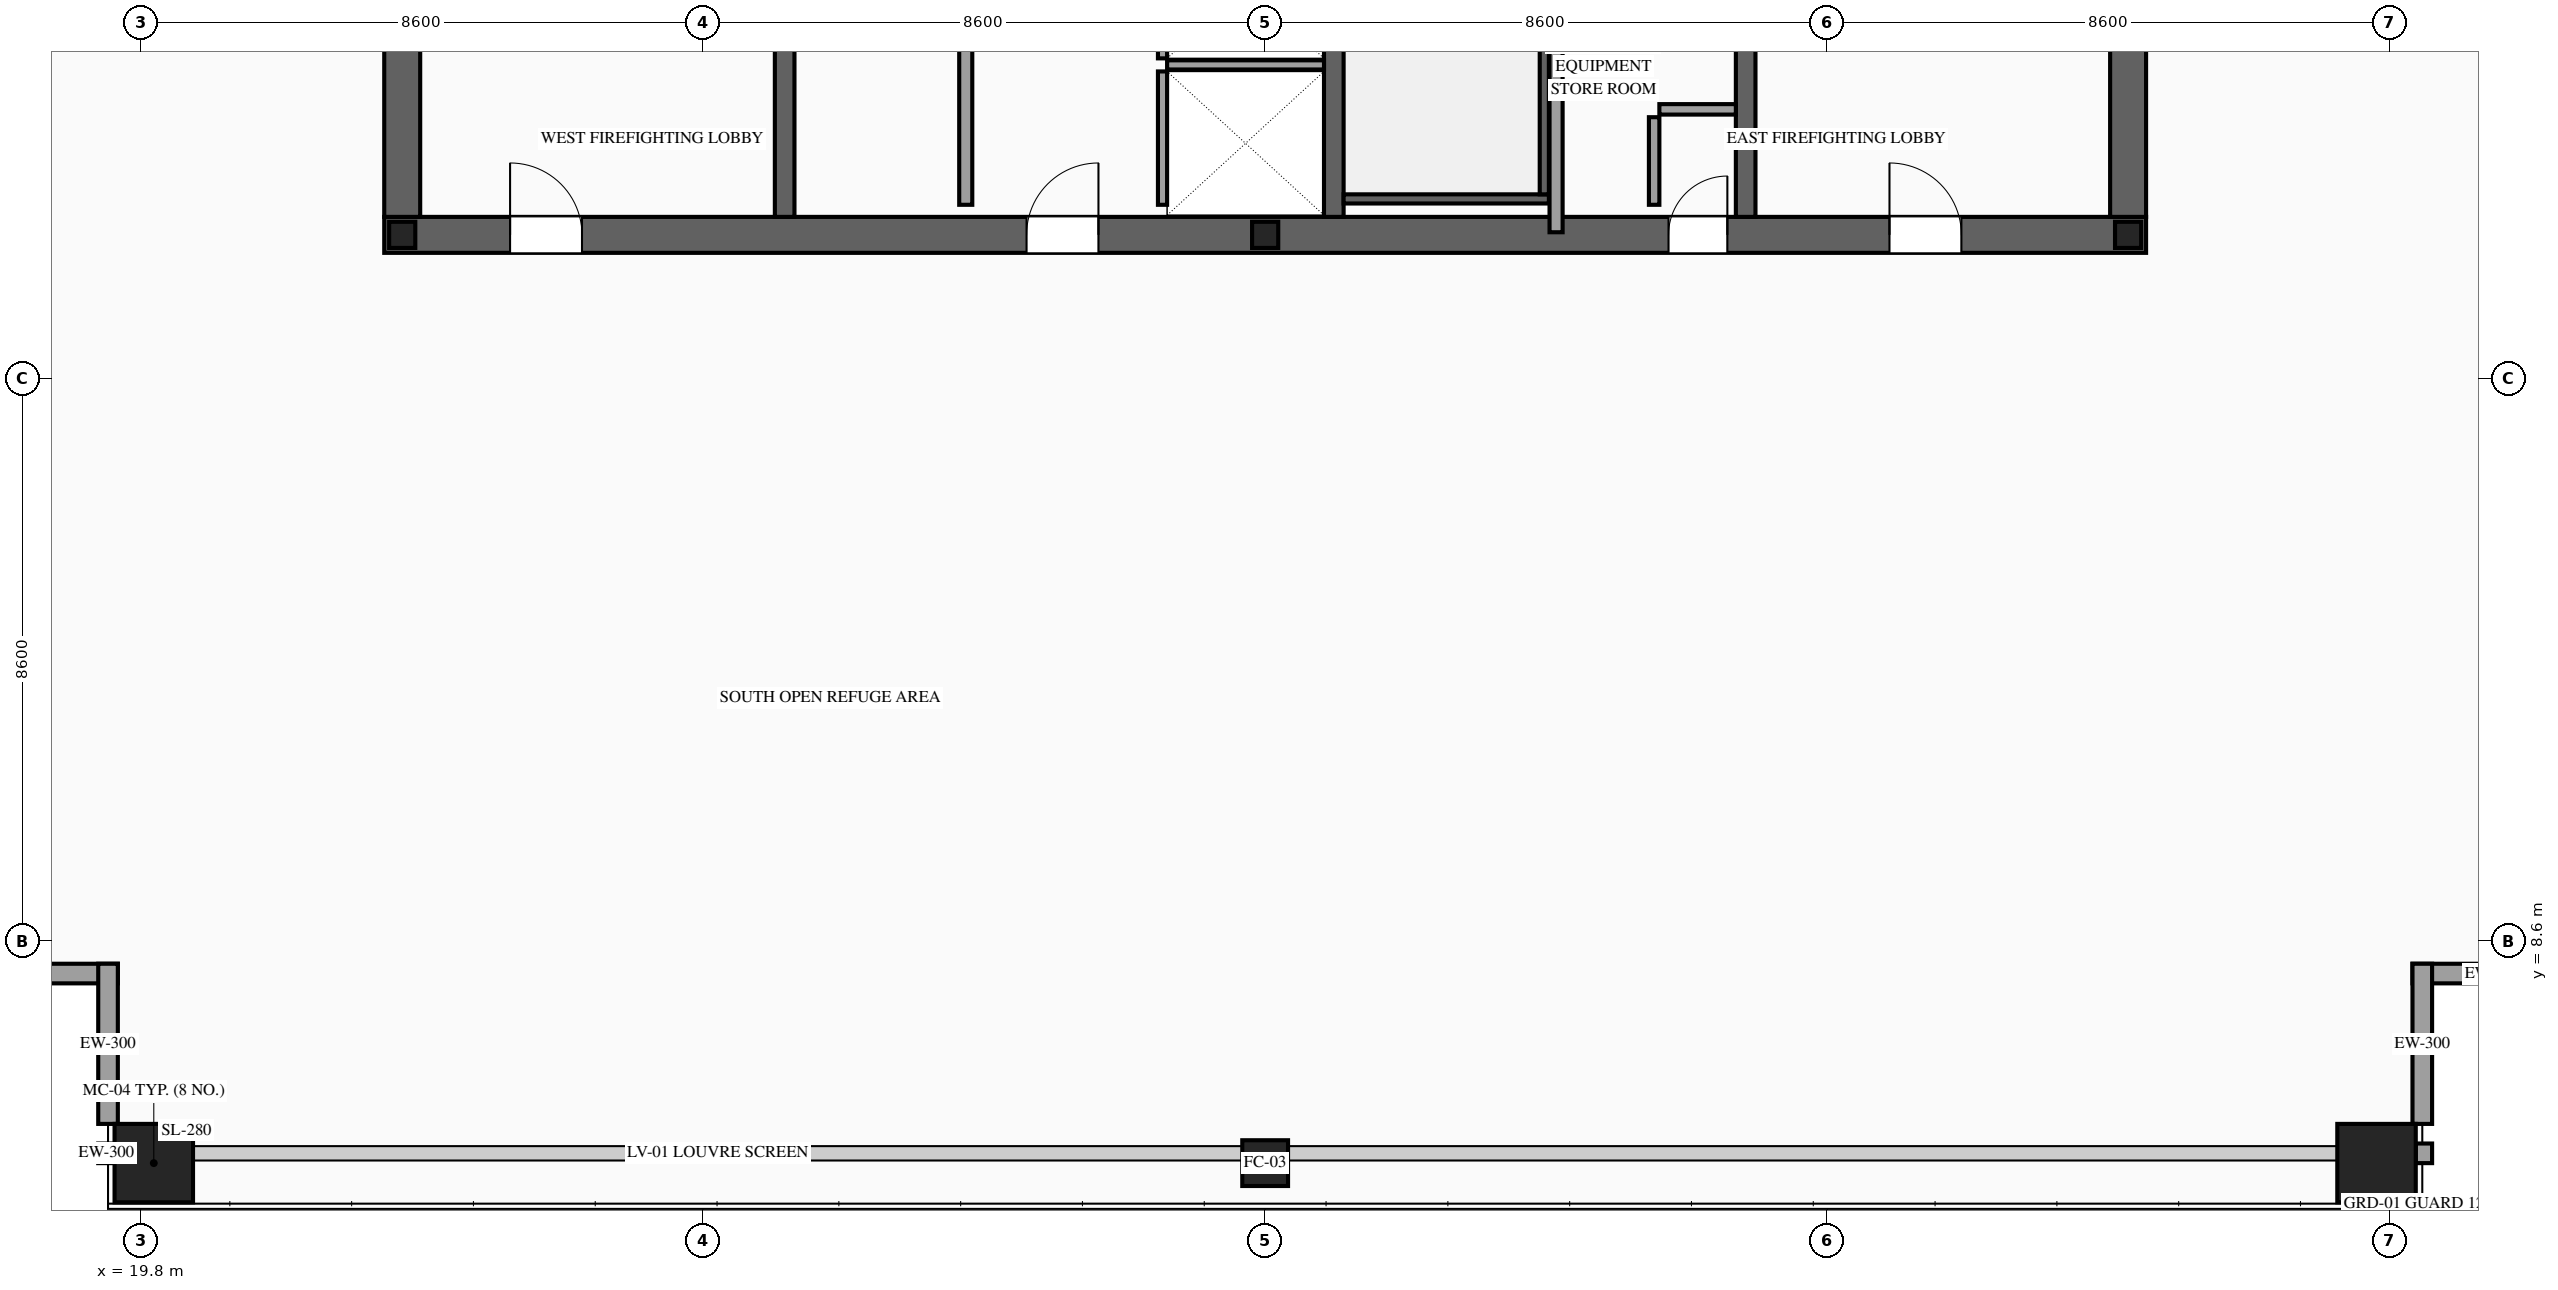
"""IFC4 building model, lengths in metres.
Left out: names, types, materials, properties, quantities, classifications, styles, units other than length and angle.
Written with IfcOpenShell. Run it as: python <this file> out.ifc"""

import sys

from ifc_helpers import new_model, si_unit, direction, frame, frame_2d, origin, origin_2d, place, context, subcontext, project, spatial, rectangle, hollow_rectangle, i_section, extrude, source, transform, mapped, element, fill, save


model = new_model("IFC4")
c1 = context("Model", 3, precision=1e-05, world=origin(), true_north=direction((0.0, 1.0)))
c2 = subcontext(c1, "Body", "Model", "MODEL_VIEW")
j1 = project(units=[si_unit("LENGTHUNIT", "METRE"), si_unit("PLANEANGLEUNIT", "RADIAN")], contexts=[c1])
p1 = place(None, origin())
s1 = spatial("IfcSite", under=j1, at=p1, CompositionType="ELEMENT")
p2 = place(p1, origin())
s2 = spatial("IfcBuilding", under=s1, at=p2, CompositionType="ELEMENT")
p3 = place(p2, frame((0.0, 0.0, 263.5)))
s3 = spatial("IfcBuildingStorey", under=s2, at=p3, CompositionType="ELEMENT", Elevation=263.5)
p4 = place(p3, frame((23.525, 19.4, 0.0), z_axis=(0.0, 0.0, 1.0), x_axis=(1.0, 0.0, 0.0)))
e1 = element("IfcWall", 1, at=p4, inside=s3, PredefinedType="SHEAR", context=c2, shape_type="SweptSolid", body=[
    extrude(rectangle(XDim=26.95, YDim=0.55, at=frame_2d((13.475, 0.0))), origin(), (0.0, 0.0, 1.0), 4.6),
])
p5 = place(p4, frame((1.925, 0.0, 0.0)))
e2 = element("IfcOpeningElement", 2, at=p5, cuts=e1, PredefinedType="OPENING", context=c2, shape_type="SweptSolid", body=[
    extrude(rectangle(XDim=1.1, YDim=2.2, at=frame_2d((0.55, 1.1))), frame((0.0, 0.29, 0.0), z_axis=(0.0, -1.0, 0.0), x_axis=(1.0, 0.0, 0.0)), (0.0, 0.0, 1.0), 0.58),
])
p6 = place(p4, frame((9.825, 0.0, 0.0)))
e3 = element("IfcOpeningElement", 3, at=p6, cuts=e1, PredefinedType="OPENING", context=c2, shape_type="SweptSolid", body=[
    extrude(rectangle(XDim=1.1, YDim=2.2, at=frame_2d((0.55, 1.1))), frame((0.0, 0.29, 0.0), z_axis=(0.0, -1.0, 0.0), x_axis=(1.0, 0.0, 0.0)), (0.0, 0.0, 1.0), 0.58),
])
p7 = place(p4, frame((23.025, 0.0, 0.0)))
e4 = element("IfcOpeningElement", 4, at=p7, cuts=e1, PredefinedType="OPENING", context=c2, shape_type="SweptSolid", body=[
    extrude(rectangle(XDim=1.1, YDim=2.2, at=frame_2d((0.55, 1.1))), frame((0.0, 0.29, 0.0), z_axis=(0.0, -1.0, 0.0), x_axis=(1.0, 0.0, 0.0)), (0.0, 0.0, 1.0), 0.58),
])
p8 = place(p4, frame((19.645, 0.0, 0.0)))
e5 = element("IfcOpeningElement", 5, at=p8, cuts=e1, PredefinedType="OPENING", context=c2, shape_type="SweptSolid", body=[
    extrude(rectangle(XDim=0.9, YDim=2.15, at=frame_2d((0.45, 1.075))), frame((0.0, 0.29, 0.0), z_axis=(0.0, -1.0, 0.0), x_axis=(1.0, 0.0, 0.0)), (0.0, 0.0, 1.0), 0.58),
])
m1 = source(origin(), c2, "Body", "SweptSolid", [
    extrude(rectangle(XDim=12.25, YDim=0.55, at=frame_2d((6.125, 0.0))), origin(), (0.0, 0.0, 1.0), 4.6),
])
for number, where, z_axis, x_axis in (
    (6, (23.8, 19.675, 0.0), (0.0, 0.0, 1.0), (0.0, 1.0, 0.0)),
    (7, (50.2, 19.675, 0.0), (0.0, 0.0, 1.0), (0.0, 1.0, 0.0)),
):
    element("IfcWall", number, at=place(p3, frame(where, z_axis=z_axis, x_axis=x_axis)), inside=s3, PredefinedType="SHEAR", context=c2, shape_type="MappedRepresentation", body=[
        mapped(m1, transform((0.0, 0.0, 0.0), scale=1.0)),
    ])
m2 = source(origin(), c2, "Body", "SweptSolid", [
    extrude(rectangle(XDim=12.25, YDim=0.3, at=frame_2d((6.125, 0.0))), origin(), (0.0, 0.0, 1.0), 4.6),
])
for number, where, z_axis, x_axis in (
    (8, (29.65, 19.675, 0.0), (0.0, 0.0, 1.0), (0.0, 1.0, 0.0)),
    (9, (38.05, 19.675, 0.0), (0.0, 0.0, 1.0), (0.0, 1.0, 0.0)),
):
    element("IfcWall", number, at=place(p3, frame(where, z_axis=z_axis, x_axis=x_axis)), inside=s3, PredefinedType="SOLIDWALL", context=c2, shape_type="MappedRepresentation", body=[
        mapped(m2, transform((0.0, 0.0, 0.0), scale=1.0)),
    ])
p9 = place(p3, frame((44.35, 19.675, 0.0), z_axis=(0.0, 0.0, 1.0), x_axis=(0.0, 1.0, 0.0)))
e10 = element("IfcWall", 10, at=p9, inside=s3, PredefinedType="SOLIDWALL", context=c2, shape_type="SweptSolid", body=[
    extrude(rectangle(XDim=12.25, YDim=0.3, at=frame_2d((6.125, 0.0))), origin(), (0.0, 0.0, 1.0), 4.6),
])
p10 = place(p9, frame((6.525, 0.0, 0.0)))
e11 = element("IfcOpeningElement", 11, at=p10, cuts=e10, PredefinedType="OPENING", context=c2, shape_type="SweptSolid", body=[
    extrude(rectangle(XDim=1.1, YDim=2.2, at=frame_2d((0.55, 1.1))), frame((0.0, 0.165, 0.0), z_axis=(0.0, -1.0, 0.0), x_axis=(1.0, 0.0, 0.0)), (0.0, 0.0, 1.0), 0.33),
])
p11 = place(p9, frame((8.625, 0.0, 0.0)))
e12 = element("IfcOpeningElement", 12, at=p11, cuts=e10, PredefinedType="OPENING", context=c2, shape_type="SweptSolid", body=[
    extrude(rectangle(XDim=1.1, YDim=2.2, at=frame_2d((0.55, 1.1))), frame((0.0, 0.165, 0.0), z_axis=(0.0, -1.0, 0.0), x_axis=(1.0, 0.0, 0.0)), (0.0, 0.0, 1.0), 0.33),
])
p12 = place(p9, frame((10.725, 0.0, 0.0)))
e13 = element("IfcOpeningElement", 13, at=p12, cuts=e10, PredefinedType="OPENING", context=c2, shape_type="SweptSolid", body=[
    extrude(rectangle(XDim=1.1, YDim=2.2, at=frame_2d((0.55, 1.1))), frame((0.0, 0.165, 0.0), z_axis=(0.0, -1.0, 0.0), x_axis=(1.0, 0.0, 0.0)), (0.0, 0.0, 1.0), 0.33),
])
m3 = source(origin(), c2, "Body", "SweptSolid", [
    extrude(i_section(OverallWidth=0.4, OverallDepth=0.4, WebThickness=0.013, FlangeThickness=0.021, at=origin_2d()), origin(), (0.0, 0.0, 1.0), 4.6),
])
for number, where, z_axis, x_axis in (
    (14, (23.8, 19.4, 0.0), (0.0, 0.0, 1.0), (1.0, 0.0, 0.0)),
    (15, (37.0, 19.4, 0.0), (0.0, 0.0, 1.0), (1.0, 0.0, 0.0)),
    (16, (50.2, 19.4, 0.0), (0.0, 0.0, 1.0), (1.0, 0.0, 0.0)),
):
    element("IfcColumn", number, at=place(p3, frame(where, z_axis=z_axis, x_axis=x_axis)), inside=s3, PredefinedType="COLUMN", context=c2, shape_type="MappedRepresentation", body=[
        mapped(m3, transform((0.0, 0.0, 0.0), scale=1.0)),
    ])
m4 = source(origin(), c2, "Body", "SweptSolid", [
    extrude(hollow_rectangle(XDim=1.2, YDim=1.2, WallThickness=0.055, at=origin_2d()), origin(), (0.0, 0.0, 1.0), 4.6),
])
p13 = place(p3, frame((20.0, 5.2, 0.0), z_axis=(0.0, 0.0, 1.0), x_axis=(1.0, 0.0, 0.0)))
e17 = element("IfcColumn", 17, at=p13, inside=s3, PredefinedType="COLUMN", context=c2, shape_type="MappedRepresentation", body=[
    mapped(m4, transform((0.0, 0.0, 0.0), scale=1.0)),
])
m5 = source(origin(), c2, "Body", "SweptSolid", [
    extrude(hollow_rectangle(XDim=0.7, YDim=0.7, WallThickness=0.032, at=origin_2d()), origin(), (0.0, 0.0, 1.0), 4.6),
])
p14 = place(p3, frame((37.0, 5.2, 0.0), z_axis=(0.0, 0.0, 1.0), x_axis=(1.0, 0.0, 0.0)))
e18 = element("IfcColumn", 18, at=p14, inside=s3, PredefinedType="COLUMN", context=c2, shape_type="MappedRepresentation", body=[
    mapped(m5, transform((0.0, 0.0, 0.0), scale=1.0)),
])
p15 = place(p3, frame((54.0, 5.2, 0.0), z_axis=(0.0, 0.0, 1.0), x_axis=(1.0, 0.0, 0.0)))
e19 = element("IfcColumn", 19, at=p15, inside=s3, PredefinedType="COLUMN", context=c2, shape_type="MappedRepresentation", body=[
    mapped(m4, transform((0.0, 0.0, 0.0), scale=1.0)),
])
m6 = source(origin(), c2, "Body", "SweptSolid", [
    extrude(rectangle(XDim=2.45, YDim=0.3, at=frame_2d((1.225, 0.0))), origin(), (0.0, 0.0, 1.0), 4.38),
])
for number, where, z_axis, x_axis in (
    (20, (17.0, 8.1, 0.0), (0.0, 0.0, 1.0), (1.0, 0.0, 0.0)),
    (21, (19.3, 8.25, 0.0), (0.0, 0.0, 1.0), (0.0, -1.0, 0.0)),
    (22, (54.55, 8.1, 0.0), (0.0, 0.0, 1.0), (1.0, 0.0, 0.0)),
    (23, (54.7, 5.8, 0.0), (0.0, 0.0, 1.0), (0.0, 1.0, 0.0)),
):
    element("IfcWall", number, at=place(p3, frame(where, z_axis=z_axis, x_axis=x_axis)), inside=s3, PredefinedType="SOLIDWALL", context=c2, shape_type="MappedRepresentation", body=[
        mapped(m6, transform((0.0, 0.0, 0.0), scale=1.0)),
    ])
m7 = source(origin(), c2, "Body", "SweptSolid", [
    extrude(rectangle(XDim=0.25, YDim=0.3, at=frame_2d((0.125, 0.0))), origin(), (0.0, 0.0, 1.0), 4.38),
])
for number, where, z_axis, x_axis in (
    (24, (19.15, 5.35, 0.0), (0.0, 0.0, 1.0), (1.0, 0.0, 0.0)),
    (25, (54.6, 5.35, 0.0), (0.0, 0.0, 1.0), (1.0, 0.0, 0.0)),
):
    element("IfcWall", number, at=place(p3, frame(where, z_axis=z_axis, x_axis=x_axis)), inside=s3, PredefinedType="SOLIDWALL", context=c2, shape_type="MappedRepresentation", body=[
        mapped(m7, transform((0.0, 0.0, 0.0), scale=1.0)),
    ])
m8 = source(origin(), c2, "Body", "SweptSolid", [
    extrude(rectangle(XDim=2.04, YDim=0.14, at=frame_2d((1.02, 0.0))), origin(), (0.0, 0.0, 1.0), 4.38),
])
p16 = place(p3, frame((35.43, 19.86, 0.0), z_axis=(0.0, 0.0, 1.0), x_axis=(0.0, 1.0, 0.0)))
e26 = element("IfcWall", 26, at=p16, inside=s3, PredefinedType="SOLIDWALL", context=c2, shape_type="MappedRepresentation", body=[
    mapped(m8, transform((0.0, 0.0, 0.0), scale=1.0)),
])
m9 = source(origin(), c2, "Body", "SweptSolid", [
    extrude(rectangle(XDim=2.4, YDim=0.14, at=frame_2d((1.2, 0.0))), origin(), (0.0, 0.0, 1.0), 4.38),
])
p17 = place(p3, frame((35.5, 22.0, 0.0), z_axis=(0.0, 0.0, 1.0), x_axis=(1.0, 0.0, 0.0)))
e27 = element("IfcWall", 27, at=p17, inside=s3, PredefinedType="SOLIDWALL", context=c2, shape_type="MappedRepresentation", body=[
    mapped(m9, transform((0.0, 0.0, 0.0), scale=1.0)),
])
m10 = source(origin(), c2, "Body", "SweptSolid", [
    extrude(rectangle(XDim=2.2, YDim=0.14, at=frame_2d((1.1, 0.0))), origin(), (0.0, 0.0, 1.0), 4.38),
])
p18 = place(p3, frame((35.43, 22.1, 0.0), z_axis=(0.0, 0.0, 1.0), x_axis=(0.0, 1.0, 0.0)))
e28 = element("IfcWall", 28, at=p18, inside=s3, PredefinedType="SOLIDWALL", context=c2, shape_type="MappedRepresentation", body=[
    mapped(m10, transform((0.0, 0.0, 0.0), scale=1.0)),
])
m11 = source(origin(), c2, "Body", "SweptSolid", [
    extrude(rectangle(XDim=3.14, YDim=0.14, at=frame_2d((1.57, 0.0))), origin(), (0.0, 0.0, 1.0), 4.38),
])
p19 = place(p3, frame((38.2, 19.95, 0.0), z_axis=(0.0, 0.0, 1.0), x_axis=(1.0, 0.0, 0.0)))
e29 = element("IfcWall", 29, at=p19, inside=s3, PredefinedType="SOLIDWALL", context=c2, shape_type="MappedRepresentation", body=[
    mapped(m11, transform((0.0, 0.0, 0.0), scale=1.0)),
])
m12 = source(origin(), c2, "Body", "SweptSolid", [
    extrude(rectangle(XDim=8.94, YDim=0.14, at=frame_2d((4.47, 0.0))), origin(), (0.0, 0.0, 1.0), 4.38),
])
p20 = place(p3, frame((41.27, 20.02, 0.0), z_axis=(0.0, 0.0, 1.0), x_axis=(0.0, 1.0, 0.0)))
e30 = element("IfcWall", 30, at=p20, inside=s3, PredefinedType="SOLIDWALL", context=c2, shape_type="MappedRepresentation", body=[
    mapped(m12, transform((0.0, 0.0, 0.0), scale=1.0)),
])
p21 = place(p3, frame((32.42, 19.86, 0.0), z_axis=(0.0, 0.0, 1.0), x_axis=(0.0, 1.0, 0.0)))
e31 = element("IfcWall", 31, at=p21, inside=s3, PredefinedType="PARTITIONING", context=c2, shape_type="SweptSolid", body=[
    extrude(rectangle(XDim=11.88, YDim=0.2, at=frame_2d((5.94, 0.0))), origin(), (0.0, 0.0, 1.0), 4.38),
])
p22 = place(p21, frame((5.49, 0.0, 0.0)))
e32 = element("IfcOpeningElement", 32, at=p22, cuts=e31, PredefinedType="OPENING", context=c2, shape_type="SweptSolid", body=[
    extrude(rectangle(XDim=0.9, YDim=2.15, at=frame_2d((0.45, 1.075))), frame((0.0, 0.115, 0.0), z_axis=(0.0, -1.0, 0.0), x_axis=(1.0, 0.0, 0.0)), (0.0, 0.0, 1.0), 0.23),
])
m13 = source(origin(), c2, "Body", "SweptSolid", [
    extrude(rectangle(XDim=1.34, YDim=0.16, at=frame_2d((0.67, 0.0))), origin(), (0.0, 0.0, 1.0), 4.38),
])
p23 = place(p3, frame((42.95, 19.86, 0.0), z_axis=(0.0, 0.0, 1.0), x_axis=(0.0, 1.0, 0.0)))
e33 = element("IfcWall", 33, at=p23, inside=s3, PredefinedType="PARTITIONING", context=c2, shape_type="MappedRepresentation", body=[
    mapped(m13, transform((0.0, 0.0, 0.0), scale=1.0)),
])
m14 = source(origin(), c2, "Body", "SweptSolid", [
    extrude(rectangle(XDim=1.17, YDim=0.16, at=frame_2d((0.585, 0.0))), origin(), (0.0, 0.0, 1.0), 4.38),
])
p24 = place(p3, frame((43.03, 21.32, 0.0), z_axis=(0.0, 0.0, 1.0), x_axis=(1.0, 0.0, 0.0)))
e34 = element("IfcWall", 34, at=p24, inside=s3, PredefinedType="PARTITIONING", context=c2, shape_type="MappedRepresentation", body=[
    mapped(m14, transform((0.0, 0.0, 0.0), scale=1.0)),
])
m15 = source(origin(), c2, "Body", "SweptSolid", [
    extrude(rectangle(XDim=6.06, YDim=0.2, at=frame_2d((3.03, 0.0))), origin(), (0.0, 0.0, 1.0), 4.38),
])
p25 = place(p3, frame((41.45, 19.44, 0.0), z_axis=(0.0, 0.0, 1.0), x_axis=(0.0, 1.0, 0.0)))
e35 = element("IfcWall", 35, at=p25, inside=s3, PredefinedType="PARTITIONING", context=c2, shape_type="MappedRepresentation", body=[
    mapped(m15, transform((0.0, 0.0, 0.0), scale=1.0)),
])
m16 = source(origin(), c2, "Body", "SweptSolid", [
    extrude(rectangle(XDim=1.1, YDim=2.2, at=frame_2d((0.55, 1.1))), frame((0.0, 0.025, 0.0), z_axis=(0.0, -1.0, 0.0), x_axis=(1.0, 0.0, 0.0)), (0.0, 0.0, 1.0), 0.05),
])
p26 = place(p5, origin())
e36 = element("IfcDoor", 36, at=p26, inside=s3, OperationType="SINGLE_SWING_LEFT", PredefinedType="DOOR", context=c2, shape_type="MappedRepresentation", body=[
    mapped(m16, transform((0.0, 0.0, 0.0), scale=1.0)),
])
fill(e2, e36)
p27 = place(p6, origin())
e37 = element("IfcDoor", 37, at=p27, inside=s3, OperationType="SINGLE_SWING_RIGHT", PredefinedType="DOOR", context=c2, shape_type="MappedRepresentation", body=[
    mapped(m16, transform((0.0, 0.0, 0.0), scale=1.0)),
])
fill(e3, e37)
p28 = place(p7, origin())
e38 = element("IfcDoor", 38, at=p28, inside=s3, OperationType="SINGLE_SWING_LEFT", PredefinedType="DOOR", context=c2, shape_type="MappedRepresentation", body=[
    mapped(m16, transform((0.0, 0.0, 0.0), scale=1.0)),
])
fill(e4, e38)
m17 = source(origin(), c2, "Body", "SweptSolid", [
    extrude(rectangle(XDim=0.9, YDim=2.15, at=frame_2d((0.45, 1.075))), frame((0.0, 0.025, 0.0), z_axis=(0.0, -1.0, 0.0), x_axis=(1.0, 0.0, 0.0)), (0.0, 0.0, 1.0), 0.05),
])
p29 = place(p8, origin())
e39 = element("IfcDoor", 39, at=p29, inside=s3, OperationType="SINGLE_SWING_RIGHT", PredefinedType="DOOR", context=c2, shape_type="MappedRepresentation", body=[
    mapped(m17, transform((0.0, 0.0, 0.0), scale=1.0)),
])
fill(e5, e39)
save(model, sys.argv[1])
